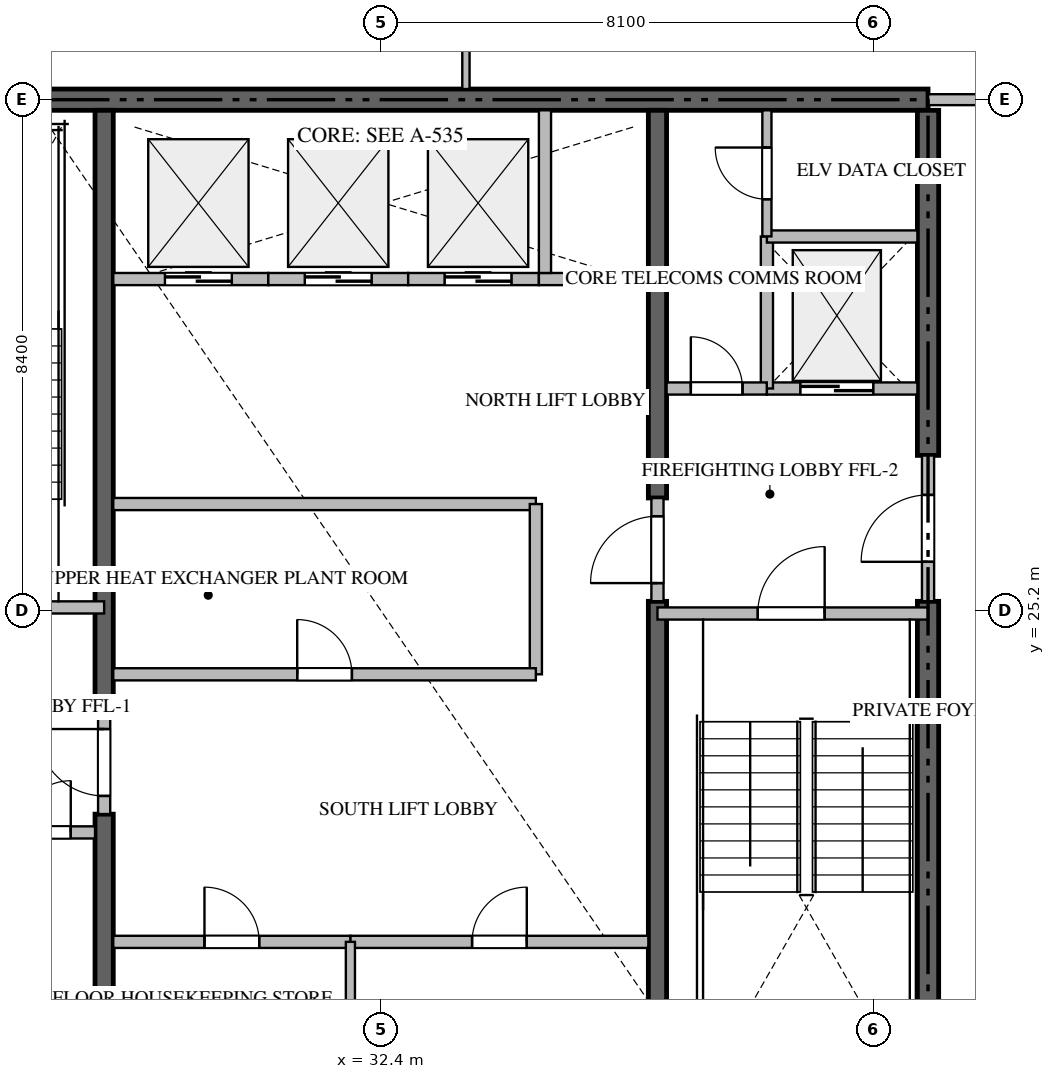
"""IFC4 building model, lengths in metres.
Left out: names, types, materials, properties, quantities, classifications, styles, units other than length and angle.
Written with IfcOpenShell. Run it as: python <this file> out.ifc"""

import sys

from ifc_helpers import new_model, si_unit, direction, frame, frame_2d, origin, place, context, subcontext, project, spatial, rectangle, extrude, source, transform, mapped, element, fill, save


model = new_model("IFC4")
c1 = context("Model", 3, precision=1e-05, world=origin(), true_north=direction((0.0, 1.0)))
c2 = subcontext(c1, "Body", "Model", "MODEL_VIEW")
j1 = project(units=[si_unit("LENGTHUNIT", "METRE"), si_unit("PLANEANGLEUNIT", "RADIAN")], contexts=[c1])
p1 = place(None, origin())
s1 = spatial("IfcSite", under=j1, at=p1, CompositionType="ELEMENT")
p2 = place(p1, origin())
s2 = spatial("IfcBuilding", under=s1, at=p2, CompositionType="ELEMENT")
p3 = place(p2, frame((0.0, 0.0, 309.65)))
s3 = spatial("IfcBuildingStorey", under=s2, at=p3, CompositionType="ELEMENT", Elevation=309.65)
p4 = place(p3, frame((41.4, 33.6, -0.26), z_axis=(0.0, 0.0, 1.0), x_axis=(-1.0, 0.0, 0.0)))
e1 = element("IfcWall", 1, at=p4, inside=s3, PredefinedType="SHEAR", context=c2, shape_type="SweptSolid", body=[
    extrude(rectangle(XDim=18.0, YDim=0.35, at=frame_2d((9.0, 0.0))), origin(), (0.0, 0.0, 1.0), 4.048),
])
p5 = place(p3, frame((41.4, 16.975, -0.26), z_axis=(0.0, 0.0, 1.0), x_axis=(0.0, 1.0, 0.0)))
e2 = element("IfcWall", 2, at=p5, inside=s3, PredefinedType="SHEAR", context=c2, shape_type="SweptSolid", body=[
    extrude(rectangle(XDim=8.375, YDim=0.35, at=frame_2d((4.188, 0.0))), origin(), (0.0, 0.0, 1.0), 4.048),
])
p6 = place(p3, frame((41.4, 27.75, -0.26), z_axis=(0.0, 0.0, 1.0), x_axis=(0.0, 1.0, 0.0)))
e3 = element("IfcWall", 3, at=p6, inside=s3, PredefinedType="SHEAR", context=c2, shape_type="SweptSolid", body=[
    extrude(rectangle(XDim=5.675, YDim=0.35, at=frame_2d((2.837, 0.0))), origin(), (0.0, 0.0, 1.0), 4.048),
])
p7 = place(p3, frame((27.85, 16.975, -0.26), z_axis=(0.0, 0.0, 1.0), x_axis=(0.0, 1.0, 0.0)))
e4 = element("IfcWall", 4, at=p7, inside=s3, PredefinedType="SHEAR", context=c2, shape_type="SweptSolid", body=[
    extrude(rectangle(XDim=4.875, YDim=0.3, at=frame_2d((2.438, 0.0))), origin(), (0.0, 0.0, 1.0), 4.048),
])
p8 = place(p3, frame((27.85, 23.55, -0.26), z_axis=(0.0, 0.0, 1.0), x_axis=(0.0, 1.0, 0.0)))
e5 = element("IfcWall", 5, at=p8, inside=s3, PredefinedType="SHEAR", context=c2, shape_type="SweptSolid", body=[
    extrude(rectangle(XDim=9.875, YDim=0.3, at=frame_2d((4.938, 0.0))), origin(), (0.0, 0.0, 1.0), 4.048),
])
p9 = place(p3, frame((36.95, 16.975, -0.26), z_axis=(0.0, 0.0, 1.0), x_axis=(0.0, 1.0, 0.0)))
e6 = element("IfcWall", 6, at=p9, inside=s3, PredefinedType="SHEAR", context=c2, shape_type="SweptSolid", body=[
    extrude(rectangle(XDim=8.375, YDim=0.3, at=frame_2d((4.188, 0.0))), origin(), (0.0, 0.0, 1.0), 4.048),
])
p10 = place(p3, frame((36.95, 27.05, -0.26), z_axis=(0.0, 0.0, 1.0), x_axis=(0.0, 1.0, 0.0)))
e7 = element("IfcWall", 7, at=p10, inside=s3, PredefinedType="SHEAR", context=c2, shape_type="SweptSolid", body=[
    extrude(rectangle(XDim=6.375, YDim=0.3, at=frame_2d((3.188, 0.0))), origin(), (0.0, 0.0, 1.0), 4.048),
])
p11 = place(p3, frame((23.4, 25.25, 0.0), z_axis=(0.0, 0.0, 1.0), x_axis=(1.0, 0.0, 0.0)))
e8 = element("IfcWall", 8, at=p11, inside=s3, PredefinedType="STANDARD", context=c2, shape_type="SweptSolid", body=[
    extrude(rectangle(XDim=4.45, YDim=0.2, at=frame_2d((2.225, 0.0))), origin(), (0.0, 0.0, 1.0), 3.79),
])
p12 = place(p11, frame((1.65, 0.0, 0.0)))
e9 = element("IfcOpeningElement", 9, at=p12, cuts=e8, PredefinedType="OPENING", context=c2, shape_type="SweptSolid", body=[
    extrude(rectangle(XDim=1.1, YDim=2.15, at=frame_2d((0.55, 1.075))), frame((0.0, 0.11, 0.0), z_axis=(0.0, -1.0, 0.0), x_axis=(1.0, 0.0, 0.0)), (0.0, 0.0, 1.0), 0.22),
])
p13 = place(p3, frame((36.95, 25.15, 0.0), z_axis=(0.0, 0.0, 1.0), x_axis=(1.0, 0.0, 0.0)))
e10 = element("IfcWall", 10, at=p13, inside=s3, PredefinedType="STANDARD", context=c2, shape_type="SweptSolid", body=[
    extrude(rectangle(XDim=4.45, YDim=0.2, at=frame_2d((2.225, 0.0))), origin(), (0.0, 0.0, 1.0), 3.79),
])
p14 = place(p13, frame((1.65, 0.0, 0.0)))
e11 = element("IfcOpeningElement", 11, at=p14, cuts=e10, PredefinedType="OPENING", context=c2, shape_type="SweptSolid", body=[
    extrude(rectangle(XDim=1.1, YDim=2.15, at=frame_2d((0.55, 1.075))), frame((0.0, 0.11, 0.0), z_axis=(0.0, -1.0, 0.0), x_axis=(1.0, 0.0, 0.0)), (0.0, 0.0, 1.0), 0.22),
])
p15 = place(p3, frame((38.75, 28.85, 0.0), z_axis=(0.0, 0.0, 1.0), x_axis=(1.0, 0.0, 0.0)))
e12 = element("IfcWall", 12, at=p15, inside=s3, PredefinedType="STANDARD", context=c2, shape_type="SweptSolid", body=[
    extrude(rectangle(XDim=2.475, YDim=0.2, at=frame_2d((1.238, 0.0))), origin(), (0.0, 0.0, 1.0), 3.79),
])
p16 = place(p15, frame((0.55, 0.0, 0.0)))
e13 = element("IfcOpeningElement", 13, at=p16, cuts=e12, PredefinedType="OPENING", context=c2, shape_type="SweptSolid", body=[
    extrude(rectangle(XDim=1.2, YDim=2.2, at=frame_2d((0.6, 1.1))), frame((0.0, 0.11, 0.0), z_axis=(0.0, -1.0, 0.0), x_axis=(1.0, 0.0, 0.0)), (0.0, 0.0, 1.0), 0.22),
])
p17 = place(p3, frame((28.0, 30.65, 0.0), z_axis=(0.0, 0.0, 1.0), x_axis=(1.0, 0.0, 0.0)))
e14 = element("IfcWall", 14, at=p17, inside=s3, PredefinedType="STANDARD", context=c2, shape_type="SweptSolid", body=[
    extrude(rectangle(XDim=2.55, YDim=0.2, at=frame_2d((1.275, 0.0))), origin(), (0.0, 0.0, 1.0), 3.79),
])
p18 = place(p17, frame((0.85, 0.0, 0.0)))
e15 = element("IfcOpeningElement", 15, at=p18, cuts=e14, PredefinedType="OPENING", context=c2, shape_type="SweptSolid", body=[
    extrude(rectangle(XDim=1.1, YDim=2.2, at=frame_2d((0.55, 1.1))), frame((0.0, 0.11, 0.0), z_axis=(0.0, -1.0, 0.0), x_axis=(1.0, 0.0, 0.0)), (0.0, 0.0, 1.0), 0.22),
])
p19 = place(p3, frame((30.55, 30.65, 0.0), z_axis=(0.0, 0.0, 1.0), x_axis=(1.0, 0.0, 0.0)))
e16 = element("IfcWall", 16, at=p19, inside=s3, PredefinedType="STANDARD", context=c2, shape_type="SweptSolid", body=[
    extrude(rectangle(XDim=2.3, YDim=0.2, at=frame_2d((1.15, 0.0))), origin(), (0.0, 0.0, 1.0), 3.79),
])
p20 = place(p19, frame((0.6, 0.0, 0.0)))
e17 = element("IfcOpeningElement", 17, at=p20, cuts=e16, PredefinedType="OPENING", context=c2, shape_type="SweptSolid", body=[
    extrude(rectangle(XDim=1.1, YDim=2.2, at=frame_2d((0.55, 1.1))), frame((0.0, 0.11, 0.0), z_axis=(0.0, -1.0, 0.0), x_axis=(1.0, 0.0, 0.0)), (0.0, 0.0, 1.0), 0.22),
])
p21 = place(p3, frame((32.85, 30.65, 0.0), z_axis=(0.0, 0.0, 1.0), x_axis=(1.0, 0.0, 0.0)))
e18 = element("IfcWall", 18, at=p21, inside=s3, PredefinedType="STANDARD", context=c2, shape_type="SweptSolid", body=[
    extrude(rectangle(XDim=2.15, YDim=0.2, at=frame_2d((1.075, 0.0))), origin(), (0.0, 0.0, 1.0), 3.79),
])
p22 = place(p21, frame((0.6, 0.0, 0.0)))
e19 = element("IfcOpeningElement", 19, at=p22, cuts=e18, PredefinedType="OPENING", context=c2, shape_type="SweptSolid", body=[
    extrude(rectangle(XDim=1.1, YDim=2.2, at=frame_2d((0.55, 1.1))), frame((0.0, 0.11, 0.0), z_axis=(0.0, -1.0, 0.0), x_axis=(1.0, 0.0, 0.0)), (0.0, 0.0, 1.0), 0.22),
])
p23 = place(p3, frame((35.0, 30.65, 0.0), z_axis=(0.0, 0.0, 1.0), x_axis=(1.0, 0.0, 0.0)))
e20 = element("IfcWall", 20, at=p23, inside=s3, PredefinedType="STANDARD", context=c2, shape_type="SweptSolid", body=[
    extrude(rectangle(XDim=1.8, YDim=0.2, at=frame_2d((0.9, 0.0))), origin(), (0.0, 0.0, 1.0), 3.79),
])
p24 = place(p3, frame((35.1, 30.75, 0.0), z_axis=(0.0, 0.0, 1.0), x_axis=(0.0, 1.0, 0.0)))
e21 = element("IfcWall", 21, at=p24, inside=s3, PredefinedType="STANDARD", context=c2, shape_type="SweptSolid", body=[
    extrude(rectangle(XDim=2.675, YDim=0.2, at=frame_2d((1.337, 0.0))), origin(), (0.0, 0.0, 1.0), 3.79),
])
p25 = place(p3, frame((26.052, 21.55, 0.0), z_axis=(0.0, 0.0, 1.0), x_axis=(1.0, 0.0, 0.0)))
e22 = element("IfcWall", 22, at=p25, inside=s3, PredefinedType="STANDARD", context=c2, shape_type="SweptSolid", body=[
    extrude(rectangle(XDim=1.648, YDim=0.2, at=frame_2d((0.824, 0.0))), origin(), (0.0, 0.0, 1.0), 3.79),
])
p26 = place(p25, frame((0.399, 0.0, 0.0)))
e23 = element("IfcOpeningElement", 23, at=p26, cuts=e22, PredefinedType="OPENING", context=c2, shape_type="SweptSolid", body=[
    extrude(rectangle(XDim=0.85, YDim=2.1, at=frame_2d((0.425, 1.05))), frame((0.0, 0.11, 0.0), z_axis=(0.0, -1.0, 0.0), x_axis=(1.0, 0.0, 0.0)), (0.0, 0.0, 1.0), 0.22),
])
p27 = place(p3, frame((38.75, 28.85, 0.0), z_axis=(0.0, 0.0, 1.0), x_axis=(0.0, 1.0, 0.0)))
e24 = element("IfcWall", 24, at=p27, inside=s3, PredefinedType="STANDARD", context=c2, shape_type="SweptSolid", body=[
    extrude(rectangle(XDim=2.5, YDim=0.2, at=frame_2d((1.25, 0.0))), origin(), (0.0, 0.0, 1.0), 3.79),
])
p28 = place(p3, frame((38.75, 31.35, 0.0), z_axis=(0.0, 0.0, 1.0), x_axis=(1.0, 0.0, 0.0)))
e25 = element("IfcWall", 25, at=p28, inside=s3, PredefinedType="STANDARD", context=c2, shape_type="SweptSolid", body=[
    extrude(rectangle(XDim=2.475, YDim=0.2, at=frame_2d((1.238, 0.0))), origin(), (0.0, 0.0, 1.0), 3.79),
])
p29 = place(p3, frame((37.1, 28.85, 0.0), z_axis=(0.0, 0.0, 1.0), x_axis=(1.0, 0.0, 0.0)))
e26 = element("IfcWall", 26, at=p29, inside=s3, PredefinedType="STANDARD", context=c2, shape_type="SweptSolid", body=[
    extrude(rectangle(XDim=1.648, YDim=0.2, at=frame_2d((0.824, 0.0))), origin(), (0.0, 0.0, 1.0), 3.79),
])
p30 = place(p29, frame((0.399, 0.0, 0.0)))
e27 = element("IfcOpeningElement", 27, at=p30, cuts=e26, PredefinedType="OPENING", context=c2, shape_type="SweptSolid", body=[
    extrude(rectangle(XDim=0.85, YDim=2.1, at=frame_2d((0.425, 1.05))), frame((0.0, 0.11, 0.0), z_axis=(0.0, -1.0, 0.0), x_axis=(1.0, 0.0, 0.0)), (0.0, 0.0, 1.0), 0.22),
])
p31 = place(p3, frame((41.4, 25.352, 0.0), z_axis=(0.0, 0.0, 1.0), x_axis=(0.0, 1.0, 0.0)))
e28 = element("IfcWall", 28, at=p31, inside=s3, PredefinedType="STANDARD", context=c2, shape_type="SweptSolid", body=[
    extrude(rectangle(XDim=2.396, YDim=0.2, at=frame_2d((1.198, 0.0))), origin(), (0.0, 0.0, 1.0), 3.79),
])
p32 = place(p31, frame((0.648, 0.0, 0.0)))
e29 = element("IfcOpeningElement", 29, at=p32, cuts=e28, PredefinedType="OPENING", context=c2, shape_type="SweptSolid", body=[
    extrude(rectangle(XDim=1.1, YDim=2.15, at=frame_2d((0.55, 1.075))), frame((0.0, 0.11, 0.0), z_axis=(0.0, -1.0, 0.0), x_axis=(1.0, 0.0, 0.0)), (0.0, 0.0, 1.0), 0.22),
])
p33 = place(p3, frame((27.85, 21.852, 0.0), z_axis=(0.0, 0.0, 1.0), x_axis=(0.0, 1.0, 0.0)))
e30 = element("IfcWall", 30, at=p33, inside=s3, PredefinedType="STANDARD", context=c2, shape_type="SweptSolid", body=[
    extrude(rectangle(XDim=1.696, YDim=0.2, at=frame_2d((0.848, 0.0))), origin(), (0.0, 0.0, 1.0), 3.79),
])
p34 = place(p33, frame((0.298, 0.0, 0.0)))
e31 = element("IfcOpeningElement", 31, at=p34, cuts=e30, PredefinedType="OPENING", context=c2, shape_type="SweptSolid", body=[
    extrude(rectangle(XDim=1.1, YDim=2.15, at=frame_2d((0.55, 1.075))), frame((0.0, 0.11, 0.0), z_axis=(0.0, -1.0, 0.0), x_axis=(1.0, 0.0, 0.0)), (0.0, 0.0, 1.0), 0.22),
])
p35 = place(p3, frame((36.95, 25.352, 0.0), z_axis=(0.0, 0.0, 1.0), x_axis=(0.0, 1.0, 0.0)))
e32 = element("IfcWall", 32, at=p35, inside=s3, PredefinedType="STANDARD", context=c2, shape_type="SweptSolid", body=[
    extrude(rectangle(XDim=1.696, YDim=0.2, at=frame_2d((0.848, 0.0))), origin(), (0.0, 0.0, 1.0), 3.79),
])
p36 = place(p35, frame((0.298, 0.0, 0.0)))
e33 = element("IfcOpeningElement", 33, at=p36, cuts=e32, PredefinedType="OPENING", context=c2, shape_type="SweptSolid", body=[
    extrude(rectangle(XDim=1.1, YDim=2.15, at=frame_2d((0.55, 1.075))), frame((0.0, 0.11, 0.0), z_axis=(0.0, -1.0, 0.0), x_axis=(1.0, 0.0, 0.0)), (0.0, 0.0, 1.0), 0.22),
])
p37 = place(p3, frame((38.75, 31.352, 0.0), z_axis=(0.0, 0.0, 1.0), x_axis=(0.0, 1.0, 0.0)))
e34 = element("IfcWall", 34, at=p37, inside=s3, PredefinedType="PARTITIONING", context=c2, shape_type="SweptSolid", body=[
    extrude(rectangle(XDim=2.073, YDim=0.15, at=frame_2d((1.037, 0.0))), origin(), (0.0, 0.0, 1.0), 3.79),
])
p38 = place(p37, frame((0.611, 0.0, 0.0)))
e35 = element("IfcOpeningElement", 35, at=p38, cuts=e34, PredefinedType="OPENING", context=c2, shape_type="SweptSolid", body=[
    extrude(rectangle(XDim=0.85, YDim=2.1, at=frame_2d((0.425, 1.05))), frame((0.0, 0.085, 0.0), z_axis=(0.0, -1.0, 0.0), x_axis=(1.0, 0.0, 0.0)), (0.0, 0.0, 1.0), 0.17),
])
p39 = place(p3, frame((28.0, 19.75, 0.0), z_axis=(0.0, 0.0, 1.0), x_axis=(1.0, 0.0, 0.0)))
e36 = element("IfcWall", 36, at=p39, inside=s3, PredefinedType="STANDARD", context=c2, shape_type="SweptSolid", body=[
    extrude(rectangle(XDim=3.9, YDim=0.2, at=frame_2d((1.95, 0.0))), origin(), (0.0, 0.0, 1.0), 3.79),
])
p40 = place(p39, frame((1.5, 0.0, 0.0)))
e37 = element("IfcOpeningElement", 37, at=p40, cuts=e36, PredefinedType="OPENING", context=c2, shape_type="SweptSolid", body=[
    extrude(rectangle(XDim=0.9, YDim=2.1, at=frame_2d((0.45, 1.05))), frame((0.0, 0.11, 0.0), z_axis=(0.0, -1.0, 0.0), x_axis=(1.0, 0.0, 0.0)), (0.0, 0.0, 1.0), 0.22),
])
p41 = place(p3, frame((31.902, 19.75, 0.0), z_axis=(0.0, 0.0, 1.0), x_axis=(1.0, 0.0, 0.0)))
e38 = element("IfcWall", 38, at=p41, inside=s3, PredefinedType="STANDARD", context=c2, shape_type="SweptSolid", body=[
    extrude(rectangle(XDim=4.898, YDim=0.2, at=frame_2d((2.449, 0.0))), origin(), (0.0, 0.0, 1.0), 3.79),
])
p42 = place(p41, frame((1.999, 0.0, 0.0)))
e39 = element("IfcOpeningElement", 39, at=p42, cuts=e38, PredefinedType="OPENING", context=c2, shape_type="SweptSolid", body=[
    extrude(rectangle(XDim=0.9, YDim=2.1, at=frame_2d((0.45, 1.05))), frame((0.0, 0.11, 0.0), z_axis=(0.0, -1.0, 0.0), x_axis=(1.0, 0.0, 0.0)), (0.0, 0.0, 1.0), 0.22),
])
p43 = place(p3, frame((31.9, 17.02, 0.0), z_axis=(0.0, 0.0, 1.0), x_axis=(0.0, 1.0, 0.0)))
e40 = element("IfcWall", 40, at=p43, inside=s3, PredefinedType="PARTITIONING", context=c2, shape_type="SweptSolid", body=[
    extrude(rectangle(XDim=2.73, YDim=0.15, at=frame_2d((1.365, 0.0))), origin(), (0.0, 0.0, 1.0), 3.79),
])
p44 = place(p3, frame((28.0, 26.95, 0.0), z_axis=(0.0, 0.0, 1.0), x_axis=(1.0, 0.0, 0.0)))
e41 = element("IfcWall", 41, at=p44, inside=s3, PredefinedType="STANDARD", context=c2, shape_type="SweptSolid", body=[
    extrude(rectangle(XDim=6.95, YDim=0.2, at=frame_2d((3.475, 0.0))), origin(), (0.0, 0.0, 1.0), 3.79),
])
p45 = place(p3, frame((34.95, 24.15, 0.0), z_axis=(0.0, 0.0, 1.0), x_axis=(0.0, 1.0, 0.0)))
e42 = element("IfcWall", 42, at=p45, inside=s3, PredefinedType="STANDARD", context=c2, shape_type="SweptSolid", body=[
    extrude(rectangle(XDim=2.8, YDim=0.2, at=frame_2d((1.4, 0.0))), origin(), (0.0, 0.0, 1.0), 3.79),
])
p46 = place(p3, frame((28.0, 24.15, 0.0), z_axis=(0.0, 0.0, 1.0), x_axis=(1.0, 0.0, 0.0)))
e43 = element("IfcWall", 43, at=p46, inside=s3, PredefinedType="STANDARD", context=c2, shape_type="SweptSolid", body=[
    extrude(rectangle(XDim=6.95, YDim=0.2, at=frame_2d((3.475, 0.0))), origin(), (0.0, 0.0, 1.0), 3.79),
])
p47 = place(p46, frame((3.025, 0.0, 0.0)))
e44 = element("IfcOpeningElement", 44, at=p47, cuts=e43, PredefinedType="OPENING", context=c2, shape_type="SweptSolid", body=[
    extrude(rectangle(XDim=0.9, YDim=2.1, at=frame_2d((0.45, 1.05))), frame((0.0, 0.11, 0.0), z_axis=(0.0, -1.0, 0.0), x_axis=(1.0, 0.0, 0.0)), (0.0, 0.0, 1.0), 0.22),
])
p48 = place(p3, frame((41.402, 33.6, 0.0), z_axis=(0.0, 0.0, 1.0), x_axis=(1.0, 0.0, 0.0)))
e45 = element("IfcWall", 45, at=p48, inside=s3, PredefinedType="PARTITIONING", context=c2, shape_type="SweptSolid", body=[
    extrude(rectangle(XDim=2.496, YDim=0.18, at=frame_2d((1.248, 0.0))), origin(), (0.0, 0.0, 1.0), 3.79),
])
p49 = place(p3, frame((33.8, 35.748, 0.0), z_axis=(0.0, 0.0, 1.0), x_axis=(0.0, -1.0, 0.0)))
e46 = element("IfcWall", 46, at=p49, inside=s3, PredefinedType="PARTITIONING", context=c2, shape_type="SweptSolid", body=[
    extrude(rectangle(XDim=1.973, YDim=0.12, at=frame_2d((0.987, 0.0))), origin(), (0.0, 0.0, 1.0), 3.79),
])
m1 = source(origin(), c2, "Body", "SweptSolid", [
    extrude(rectangle(XDim=1.1, YDim=2.15, at=frame_2d((0.55, 1.075))), frame((0.0, 0.025, 0.0), z_axis=(0.0, -1.0, 0.0), x_axis=(1.0, 0.0, 0.0)), (0.0, 0.0, 1.0), 0.05),
])
p50 = place(p14, origin())
e47 = element("IfcDoor", 47, at=p50, inside=s3, OperationType="SINGLE_SWING_RIGHT", PredefinedType="DOOR", context=c2, shape_type="MappedRepresentation", body=[
    mapped(m1, transform((0.0, 0.0, 0.0), scale=1.0)),
])
fill(e11, e47)
m2 = source(origin(), c2, "Body", "SweptSolid", [
    extrude(rectangle(XDim=1.2, YDim=2.2, at=frame_2d((0.6, 1.1))), frame((0.0, 0.025, 0.0), z_axis=(0.0, -1.0, 0.0), x_axis=(1.0, 0.0, 0.0)), (0.0, 0.0, 1.0), 0.05),
])
p51 = place(p16, origin())
e48 = element("IfcDoor", 48, at=p51, inside=s3, OperationType="DOUBLE_DOOR_SLIDING", PredefinedType="DOOR", context=c2, shape_type="MappedRepresentation", body=[
    mapped(m2, transform((0.0, 0.0, 0.0), scale=1.0)),
])
fill(e13, e48)
m3 = source(origin(), c2, "Body", "SweptSolid", [
    extrude(rectangle(XDim=1.1, YDim=2.2, at=frame_2d((0.55, 1.1))), frame((0.0, 0.025, 0.0), z_axis=(0.0, -1.0, 0.0), x_axis=(1.0, 0.0, 0.0)), (0.0, 0.0, 1.0), 0.05),
])
p52 = place(p18, origin())
e49 = element("IfcDoor", 49, at=p52, inside=s3, OperationType="DOUBLE_DOOR_SLIDING", PredefinedType="DOOR", context=c2, shape_type="MappedRepresentation", body=[
    mapped(m3, transform((0.0, 0.0, 0.0), scale=1.0)),
])
fill(e15, e49)
p53 = place(p20, origin())
e50 = element("IfcDoor", 50, at=p53, inside=s3, OperationType="DOUBLE_DOOR_SLIDING", PredefinedType="DOOR", context=c2, shape_type="MappedRepresentation", body=[
    mapped(m3, transform((0.0, 0.0, 0.0), scale=1.0)),
])
fill(e17, e50)
p54 = place(p22, origin())
e51 = element("IfcDoor", 51, at=p54, inside=s3, OperationType="DOUBLE_DOOR_SLIDING", PredefinedType="DOOR", context=c2, shape_type="MappedRepresentation", body=[
    mapped(m3, transform((0.0, 0.0, 0.0), scale=1.0)),
])
fill(e19, e51)
m4 = source(origin(), c2, "Body", "SweptSolid", [
    extrude(rectangle(XDim=0.85, YDim=2.1, at=frame_2d((0.425, 1.05))), frame((0.0, 0.025, 0.0), z_axis=(0.0, -1.0, 0.0), x_axis=(1.0, 0.0, 0.0)), (0.0, 0.0, 1.0), 0.05),
])
p55 = place(p26, origin())
e52 = element("IfcDoor", 52, at=p55, inside=s3, OperationType="SINGLE_SWING_RIGHT", PredefinedType="DOOR", context=c2, shape_type="MappedRepresentation", body=[
    mapped(m4, transform((0.0, 0.0, 0.0), scale=1.0)),
])
fill(e23, e52)
p56 = place(p30, origin())
e53 = element("IfcDoor", 53, at=p56, inside=s3, OperationType="SINGLE_SWING_LEFT", PredefinedType="DOOR", context=c2, shape_type="MappedRepresentation", body=[
    mapped(m4, transform((0.0, 0.0, 0.0), scale=1.0)),
])
fill(e27, e53)
p57 = place(p32, origin())
e54 = element("IfcDoor", 54, at=p57, inside=s3, OperationType="SINGLE_SWING_LEFT", PredefinedType="DOOR", context=c2, shape_type="MappedRepresentation", body=[
    mapped(m1, transform((0.0, 0.0, 0.0), scale=1.0)),
])
fill(e29, e54)
p58 = place(p34, origin())
e55 = element("IfcDoor", 55, at=p58, inside=s3, OperationType="SINGLE_SWING_RIGHT", PredefinedType="DOOR", context=c2, shape_type="MappedRepresentation", body=[
    mapped(m1, transform((0.0, 0.0, 0.0), scale=1.0)),
])
fill(e31, e55)
p59 = place(p36, origin())
e56 = element("IfcDoor", 56, at=p59, inside=s3, OperationType="SINGLE_SWING_LEFT", PredefinedType="DOOR", context=c2, shape_type="MappedRepresentation", body=[
    mapped(m1, transform((0.0, 0.0, 0.0), scale=1.0)),
])
fill(e33, e56)
p60 = place(p38, origin())
e57 = element("IfcDoor", 57, at=p60, inside=s3, OperationType="SINGLE_SWING_RIGHT", PredefinedType="DOOR", context=c2, shape_type="MappedRepresentation", body=[
    mapped(m4, transform((0.0, 0.0, 0.0), scale=1.0)),
])
fill(e35, e57)
m5 = source(origin(), c2, "Body", "SweptSolid", [
    extrude(rectangle(XDim=0.9, YDim=2.1, at=frame_2d((0.45, 1.05))), frame((0.0, 0.025, 0.0), z_axis=(0.0, -1.0, 0.0), x_axis=(1.0, 0.0, 0.0)), (0.0, 0.0, 1.0), 0.05),
])
p61 = place(p40, origin())
e58 = element("IfcDoor", 58, at=p61, inside=s3, OperationType="SINGLE_SWING_LEFT", PredefinedType="DOOR", context=c2, shape_type="MappedRepresentation", body=[
    mapped(m5, transform((0.0, 0.0, 0.0), scale=1.0)),
])
fill(e37, e58)
p62 = place(p42, origin())
e59 = element("IfcDoor", 59, at=p62, inside=s3, OperationType="SINGLE_SWING_RIGHT", PredefinedType="DOOR", context=c2, shape_type="MappedRepresentation", body=[
    mapped(m5, transform((0.0, 0.0, 0.0), scale=1.0)),
])
fill(e39, e59)
p63 = place(p47, origin())
e60 = element("IfcDoor", 60, at=p63, inside=s3, OperationType="SINGLE_SWING_LEFT", PredefinedType="DOOR", context=c2, shape_type="MappedRepresentation", body=[
    mapped(m5, transform((0.0, 0.0, 0.0), scale=1.0)),
])
fill(e44, e60)
save(model, sys.argv[1])
